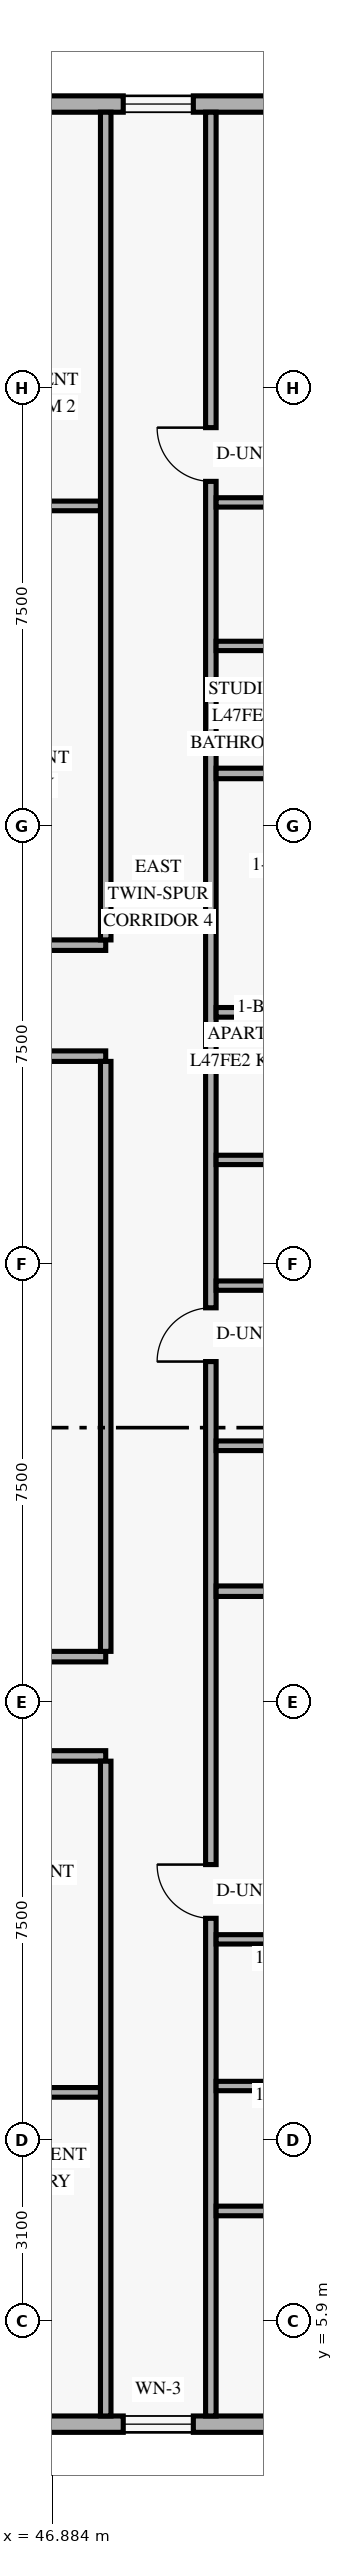
"""IFC4 building model, lengths in metres.
Left out: names, types, materials, properties, quantities, classifications, styles, units other than length and angle.
Written with IfcOpenShell. Run it as: python <this file> out.ifc"""

import sys

from ifc_helpers import new_model, si_unit, direction, frame, frame_2d, origin, place, context, subcontext, project, spatial, rectangle, extrude, element, fill, save


model = new_model("IFC4")
c1 = context("Model", 3, precision=1e-05, world=origin(), true_north=direction((0.0, 1.0)))
c2 = subcontext(c1, "Body", "Model", "MODEL_VIEW")
j1 = project(units=[si_unit("LENGTHUNIT", "METRE"), si_unit("PLANEANGLEUNIT", "RADIAN")], contexts=[c1])
p1 = place(None, origin())
s1 = spatial("IfcSite", under=j1, at=p1, CompositionType="ELEMENT")
p2 = place(p1, origin())
s2 = spatial("IfcBuilding", under=s1, at=p2, CompositionType="ELEMENT")
p3 = place(p2, frame((0.0, 0.0, 181.2)))
s3 = spatial("IfcBuildingStorey", under=s2, at=p3, CompositionType="ELEMENT", Elevation=181.2)
p4 = place(p3, frame((21.22, 4.14, 0.0), z_axis=(0.0, 0.0, 1.0), x_axis=(1.0, 0.0, 0.0)))
e1 = element("IfcWall", 1, at=p4, inside=s3, PredefinedType="SOLIDWALL", context=c2, shape_type="SweptSolid", body=[
    extrude(rectangle(XDim=33.76, YDim=0.28, at=frame_2d((16.88, 0.0))), origin(), (0.0, 0.0, 1.0), 3.36),
])
p5 = place(p4, frame((1.905, 0.0, 0.85)))
e2 = element("IfcOpeningElement", 2, at=p5, cuts=e1, PredefinedType="OPENING", context=c2, shape_type="SweptSolid", body=[
    extrude(rectangle(XDim=1.8, YDim=1.6, at=frame_2d((0.9, 0.8))), frame((0.0, 0.15, 0.0), z_axis=(0.0, -1.0, 0.0), x_axis=(1.0, 0.0, 0.0)), (0.0, 0.0, 1.0), 0.3),
])
p6 = place(p4, frame((8.79, 0.0, 0.85)))
e3 = element("IfcOpeningElement", 3, at=p6, cuts=e1, PredefinedType="OPENING", context=c2, shape_type="SweptSolid", body=[
    extrude(rectangle(XDim=1.8, YDim=1.6, at=frame_2d((0.9, 0.8))), frame((0.0, 0.15, 0.0), z_axis=(0.0, -1.0, 0.0), x_axis=(1.0, 0.0, 0.0)), (0.0, 0.0, 1.0), 0.3),
])
p7 = place(p4, frame((14.665, 0.0, 0.85)))
e4 = element("IfcOpeningElement", 4, at=p7, cuts=e1, PredefinedType="OPENING", context=c2, shape_type="SweptSolid", body=[
    extrude(rectangle(XDim=1.2, YDim=1.5, at=frame_2d((0.6, 0.75))), frame((0.0, 0.15, 0.0), z_axis=(0.0, -1.0, 0.0), x_axis=(1.0, 0.0, 0.0)), (0.0, 0.0, 1.0), 0.3),
])
p8 = place(p4, frame((18.525, 0.0, 0.85)))
e5 = element("IfcOpeningElement", 5, at=p8, cuts=e1, PredefinedType="OPENING", context=c2, shape_type="SweptSolid", body=[
    extrude(rectangle(XDim=1.8, YDim=1.6, at=frame_2d((0.9, 0.8))), frame((0.0, 0.15, 0.0), z_axis=(0.0, -1.0, 0.0), x_axis=(1.0, 0.0, 0.0)), (0.0, 0.0, 1.0), 0.3),
])
p9 = place(p4, frame((23.65, 0.0, 0.85)))
e6 = element("IfcOpeningElement", 6, at=p9, cuts=e1, PredefinedType="OPENING", context=c2, shape_type="SweptSolid", body=[
    extrude(rectangle(XDim=1.8, YDim=1.6, at=frame_2d((0.9, 0.8))), frame((0.0, 0.15, 0.0), z_axis=(0.0, -1.0, 0.0), x_axis=(1.0, 0.0, 0.0)), (0.0, 0.0, 1.0), 0.3),
])
p10 = place(p4, frame((26.88, 0.0, 0.85)))
e7 = element("IfcOpeningElement", 7, at=p10, cuts=e1, PredefinedType="OPENING", context=c2, shape_type="SweptSolid", body=[
    extrude(rectangle(XDim=1.2, YDim=1.5, at=frame_2d((0.6, 0.75))), frame((0.0, 0.15, 0.0), z_axis=(0.0, -1.0, 0.0), x_axis=(1.0, 0.0, 0.0)), (0.0, 0.0, 1.0), 0.3),
])
p11 = place(p4, frame((30.17, 0.0, 0.85)))
e8 = element("IfcOpeningElement", 8, at=p11, cuts=e1, PredefinedType="OPENING", context=c2, shape_type="SweptSolid", body=[
    extrude(rectangle(XDim=1.8, YDim=1.6, at=frame_2d((0.9, 0.8))), frame((0.0, 0.15, 0.0), z_axis=(0.0, -1.0, 0.0), x_axis=(1.0, 0.0, 0.0)), (0.0, 0.0, 1.0), 0.3),
])
p12 = place(p3, frame((54.98, 43.86, 0.0), z_axis=(0.0, 0.0, 1.0), x_axis=(-1.0, 0.0, 0.0)))
e9 = element("IfcWall", 9, at=p12, inside=s3, PredefinedType="SOLIDWALL", context=c2, shape_type="SweptSolid", body=[
    extrude(rectangle(XDim=33.76, YDim=0.28, at=frame_2d((16.88, 0.0))), origin(), (0.0, 0.0, 1.0), 3.36),
])
p13 = place(p12, frame((28.055, 0.0, 0.85)))
e10 = element("IfcOpeningElement", 10, at=p13, cuts=e9, PredefinedType="OPENING", context=c2, shape_type="SweptSolid", body=[
    extrude(rectangle(XDim=1.8, YDim=1.6, at=frame_2d((0.9, 0.8))), frame((0.0, 0.15, 0.0), z_axis=(0.0, -1.0, 0.0), x_axis=(1.0, 0.0, 0.0)), (0.0, 0.0, 1.0), 0.3),
])
p14 = place(p12, frame((21.17, 0.0, 0.85)))
e11 = element("IfcOpeningElement", 11, at=p14, cuts=e9, PredefinedType="OPENING", context=c2, shape_type="SweptSolid", body=[
    extrude(rectangle(XDim=1.8, YDim=1.6, at=frame_2d((0.9, 0.8))), frame((0.0, 0.15, 0.0), z_axis=(0.0, -1.0, 0.0), x_axis=(1.0, 0.0, 0.0)), (0.0, 0.0, 1.0), 0.3),
])
p15 = place(p12, frame((17.44, 0.0, 0.85)))
e12 = element("IfcOpeningElement", 12, at=p15, cuts=e9, PredefinedType="OPENING", context=c2, shape_type="SweptSolid", body=[
    extrude(rectangle(XDim=1.8, YDim=1.6, at=frame_2d((0.9, 0.8))), frame((0.0, 0.15, 0.0), z_axis=(0.0, -1.0, 0.0), x_axis=(1.0, 0.0, 0.0)), (0.0, 0.0, 1.0), 0.3),
])
p16 = place(p12, frame((13.32, 0.0, 0.85)))
e13 = element("IfcOpeningElement", 13, at=p16, cuts=e9, PredefinedType="OPENING", context=c2, shape_type="SweptSolid", body=[
    extrude(rectangle(XDim=1.8, YDim=1.6, at=frame_2d((0.9, 0.8))), frame((0.0, 0.15, 0.0), z_axis=(0.0, -1.0, 0.0), x_axis=(1.0, 0.0, 0.0)), (0.0, 0.0, 1.0), 0.3),
])
p17 = place(p12, frame((8.35, 0.0, 0.85)))
e14 = element("IfcOpeningElement", 14, at=p17, cuts=e9, PredefinedType="OPENING", context=c2, shape_type="SweptSolid", body=[
    extrude(rectangle(XDim=1.8, YDim=1.6, at=frame_2d((0.9, 0.8))), frame((0.0, 0.15, 0.0), z_axis=(0.0, -1.0, 0.0), x_axis=(1.0, 0.0, 0.0)), (0.0, 0.0, 1.0), 0.3),
])
p18 = place(p12, frame((5.68, 0.0, 0.85)))
e15 = element("IfcOpeningElement", 15, at=p18, cuts=e9, PredefinedType="OPENING", context=c2, shape_type="SweptSolid", body=[
    extrude(rectangle(XDim=1.2, YDim=1.5, at=frame_2d((0.6, 0.75))), frame((0.0, 0.15, 0.0), z_axis=(0.0, -1.0, 0.0), x_axis=(1.0, 0.0, 0.0)), (0.0, 0.0, 1.0), 0.3),
])
p19 = place(p12, frame((1.79, 0.0, 0.85)))
e16 = element("IfcOpeningElement", 16, at=p19, cuts=e9, PredefinedType="OPENING", context=c2, shape_type="SweptSolid", body=[
    extrude(rectangle(XDim=1.8, YDim=1.6, at=frame_2d((0.9, 0.8))), frame((0.0, 0.15, 0.0), z_axis=(0.0, -1.0, 0.0), x_axis=(1.0, 0.0, 0.0)), (0.0, 0.0, 1.0), 0.3),
])
p20 = place(p3, frame((37.633, 15.58, 0.0), z_axis=(0.0, 0.0, 1.0), x_axis=(1.0, 0.0, 0.0)))
e17 = element("IfcWall", 17, at=p20, inside=s3, PredefinedType="STANDARD", context=c2, shape_type="SweptSolid", body=[
    extrude(rectangle(XDim=10.167, YDim=0.18, at=frame_2d((5.084, 0.0))), origin(), (0.0, 0.0, 1.0), 2.73),
])
p21 = place(p20, frame((0.327, 0.0, 0.0)))
e18 = element("IfcOpeningElement", 18, at=p21, cuts=e17, PredefinedType="OPENING", context=c2, shape_type="SweptSolid", body=[
    extrude(rectangle(XDim=0.92, YDim=2.15, at=frame_2d((0.46, 1.075))), frame((0.0, 0.1, 0.0), z_axis=(0.0, -1.0, 0.0), x_axis=(1.0, 0.0, 0.0)), (0.0, 0.0, 1.0), 0.2),
])
p22 = place(p3, frame((37.64, 17.28, 0.0), z_axis=(0.0, 0.0, 1.0), x_axis=(1.0, 0.0, 0.0)))
e19 = element("IfcWall", 19, at=p22, inside=s3, PredefinedType="STANDARD", context=c2, shape_type="SweptSolid", body=[
    extrude(rectangle(XDim=10.16, YDim=0.18, at=frame_2d((5.08, 0.0))), origin(), (0.0, 0.0, 1.0), 2.73),
])
p23 = place(p22, frame((7.137, 0.0, 0.0)))
e20 = element("IfcOpeningElement", 20, at=p23, cuts=e19, PredefinedType="OPENING", context=c2, shape_type="SweptSolid", body=[
    extrude(rectangle(XDim=0.92, YDim=2.15, at=frame_2d((0.46, 1.075))), frame((0.0, 0.1, 0.0), z_axis=(0.0, -1.0, 0.0), x_axis=(1.0, 0.0, 0.0)), (0.0, 0.0, 1.0), 0.2),
])
p24 = place(p3, frame((37.64, 27.56, 0.0), z_axis=(0.0, 0.0, 1.0), x_axis=(1.0, 0.0, 0.0)))
e21 = element("IfcWall", 21, at=p24, inside=s3, PredefinedType="STANDARD", context=c2, shape_type="SweptSolid", body=[
    extrude(rectangle(XDim=10.16, YDim=0.18, at=frame_2d((5.08, 0.0))), origin(), (0.0, 0.0, 1.0), 2.73),
])
p25 = place(p3, frame((35.51, 29.46, 0.0), z_axis=(0.0, 0.0, 1.0), x_axis=(1.0, 0.0, 0.0)))
e22 = element("IfcWall", 22, at=p25, inside=s3, PredefinedType="STANDARD", context=c2, shape_type="SweptSolid", body=[
    extrude(rectangle(XDim=12.29, YDim=0.18, at=frame_2d((6.145, 0.0))), origin(), (0.0, 0.0, 1.0), 2.73),
])
p26 = place(p25, frame((0.32, 0.0, 0.0)))
e23 = element("IfcOpeningElement", 23, at=p26, cuts=e22, PredefinedType="OPENING", context=c2, shape_type="SweptSolid", body=[
    extrude(rectangle(XDim=0.92, YDim=2.15, at=frame_2d((0.46, 1.075))), frame((0.0, 0.1, 0.0), z_axis=(0.0, -1.0, 0.0), x_axis=(1.0, 0.0, 0.0)), (0.0, 0.0, 1.0), 0.2),
])
p27 = place(p3, frame((43.82, 9.82, 0.0), z_axis=(0.0, 0.0, 1.0), x_axis=(1.0, 0.0, 0.0)))
e24 = element("IfcWall", 24, at=p27, inside=s3, PredefinedType="PARTITIONING", context=c2, shape_type="SweptSolid", body=[
    extrude(rectangle(XDim=3.89, YDim=0.165, at=frame_2d((1.945, 0.0))), origin(), (0.0, 0.0, 1.0), 2.73),
])
p28 = place(p3, frame((43.74, 36.98, 0.0), z_axis=(0.0, 0.0, 1.0), x_axis=(1.0, 0.0, 0.0)))
e25 = element("IfcWall", 25, at=p28, inside=s3, PredefinedType="PARTITIONING", context=c2, shape_type="SweptSolid", body=[
    extrude(rectangle(XDim=3.97, YDim=0.165, at=frame_2d((1.985, 0.0))), origin(), (0.0, 0.0, 1.0), 2.73),
])
p29 = place(p3, frame((49.6, 4.28, 0.0), z_axis=(0.0, 0.0, 1.0), x_axis=(0.0, 1.0, 0.0)))
e26 = element("IfcWall", 26, at=p29, inside=s3, PredefinedType="STANDARD", context=c2, shape_type="SweptSolid", body=[
    extrude(rectangle(XDim=39.44, YDim=0.18, at=frame_2d((19.72, 0.0))), origin(), (0.0, 0.0, 1.0), 2.73),
])
p30 = place(p29, frame((8.52, 0.0, 0.0)))
e27 = element("IfcOpeningElement", 27, at=p30, cuts=e26, PredefinedType="OPENING", context=c2, shape_type="SweptSolid", body=[
    extrude(rectangle(XDim=0.92, YDim=2.15, at=frame_2d((0.46, 1.075))), frame((0.0, 0.1, 0.0), z_axis=(0.0, -1.0, 0.0), x_axis=(1.0, 0.0, 0.0)), (0.0, 0.0, 1.0), 0.2),
])
p31 = place(p29, frame((18.052, 0.0, 0.0)))
e28 = element("IfcOpeningElement", 28, at=p31, cuts=e26, PredefinedType="OPENING", context=c2, shape_type="SweptSolid", body=[
    extrude(rectangle(XDim=0.92, YDim=2.15, at=frame_2d((0.46, 1.075))), frame((0.0, 0.1, 0.0), z_axis=(0.0, -1.0, 0.0), x_axis=(1.0, 0.0, 0.0)), (0.0, 0.0, 1.0), 0.2),
])
p32 = place(p29, frame((33.12, 0.0, 0.0)))
e29 = element("IfcOpeningElement", 29, at=p32, cuts=e26, PredefinedType="OPENING", context=c2, shape_type="SweptSolid", body=[
    extrude(rectangle(XDim=0.92, YDim=2.15, at=frame_2d((0.46, 1.075))), frame((0.0, 0.1, 0.0), z_axis=(0.0, -1.0, 0.0), x_axis=(1.0, 0.0, 0.0)), (0.0, 0.0, 1.0), 0.2),
])
p33 = place(p3, frame((47.8, 4.28, 0.0), z_axis=(0.0, 0.0, 1.0), x_axis=(0.0, 1.0, 0.0)))
e30 = element("IfcWall", 30, at=p33, inside=s3, PredefinedType="STANDARD", context=c2, shape_type="SweptSolid", body=[
    extrude(rectangle(XDim=11.21, YDim=0.18, at=frame_2d((5.605, 0.0))), origin(), (0.0, 0.0, 1.0), 2.73),
])
p34 = place(p3, frame((47.8, 17.37, 0.0), z_axis=(0.0, 0.0, 1.0), x_axis=(0.0, 1.0, 0.0)))
e31 = element("IfcWall", 31, at=p34, inside=s3, PredefinedType="STANDARD", context=c2, shape_type="SweptSolid", body=[
    extrude(rectangle(XDim=10.1, YDim=0.18, at=frame_2d((5.05, 0.0))), origin(), (0.0, 0.0, 1.0), 2.73),
])
p35 = place(p3, frame((47.8, 29.55, 0.0), z_axis=(0.0, 0.0, 1.0), x_axis=(0.0, 1.0, 0.0)))
e32 = element("IfcWall", 32, at=p35, inside=s3, PredefinedType="STANDARD", context=c2, shape_type="SweptSolid", body=[
    extrude(rectangle(XDim=14.17, YDim=0.18, at=frame_2d((7.085, 0.0))), origin(), (0.0, 0.0, 1.0), 2.73),
])
p36 = place(p3, frame((49.69, 7.79, 0.0), z_axis=(0.0, 0.0, 1.0), x_axis=(1.0, 0.0, 0.0)))
e33 = element("IfcWall", 33, at=p36, inside=s3, PredefinedType="PARTITIONING", context=c2, shape_type="SweptSolid", body=[
    extrude(rectangle(XDim=8.63, YDim=0.165, at=frame_2d((4.315, 0.0))), origin(), (0.0, 0.0, 1.0), 2.879),
])
p37 = place(p36, frame((6.736, 0.0, 0.0)))
e34 = element("IfcOpeningElement", 34, at=p37, cuts=e33, PredefinedType="OPENING", context=c2, shape_type="SweptSolid", body=[
    extrude(rectangle(XDim=0.9, YDim=2.14, at=frame_2d((0.45, 1.07))), frame((0.0, 0.093, 0.0), z_axis=(0.0, -1.0, 0.0), x_axis=(1.0, 0.0, 0.0)), (0.0, 0.0, 1.0), 0.185),
])
p38 = place(p3, frame((49.69, 12.44, 0.0), z_axis=(0.0, 0.0, 1.0), x_axis=(1.0, 0.0, 0.0)))
e35 = element("IfcWall", 35, at=p38, inside=s3, PredefinedType="PLUMBINGWALL", context=c2, shape_type="SweptSolid", body=[
    extrude(rectangle(XDim=5.511, YDim=0.16, at=frame_2d((2.756, 0.0))), origin(), (0.0, 0.0, 1.0), 2.879),
])
p39 = place(p3, frame((49.69, 9.929, 0.0), z_axis=(0.0, 0.0, 1.0), x_axis=(1.0, 0.0, 0.0)))
e36 = element("IfcWall", 36, at=p39, inside=s3, PredefinedType="PLUMBINGWALL", context=c2, shape_type="SweptSolid", body=[
    extrude(rectangle(XDim=5.351, YDim=0.16, at=frame_2d((2.676, 0.0))), origin(), (0.0, 0.0, 1.0), 2.879),
])
p40 = place(p3, frame((49.69, 18.4, 0.0), z_axis=(0.0, 0.0, 1.0), x_axis=(1.0, 0.0, 0.0)))
e37 = element("IfcWall", 37, at=p40, inside=s3, PredefinedType="PARTITIONING", context=c2, shape_type="SweptSolid", body=[
    extrude(rectangle(XDim=8.63, YDim=0.18, at=frame_2d((4.315, 0.0))), origin(), (0.0, 0.0, 1.0), 2.879),
])
p41 = place(p3, frame((49.69, 28.31, 0.0), z_axis=(0.0, 0.0, 1.0), x_axis=(1.0, 0.0, 0.0)))
e38 = element("IfcWall", 38, at=p41, inside=s3, PredefinedType="PARTITIONING", context=c2, shape_type="SweptSolid", body=[
    extrude(rectangle(XDim=8.63, YDim=0.165, at=frame_2d((4.315, 0.0))), origin(), (0.0, 0.0, 1.0), 2.879),
])
p42 = place(p41, frame((2.796, 0.0, 0.0)))
e39 = element("IfcOpeningElement", 39, at=p42, cuts=e38, PredefinedType="OPENING", context=c2, shape_type="SweptSolid", body=[
    extrude(rectangle(XDim=0.88, YDim=2.12, at=frame_2d((0.44, 1.06))), frame((0.0, 0.093, 0.0), z_axis=(0.0, -1.0, 0.0), x_axis=(1.0, 0.0, 0.0)), (0.0, 0.0, 1.0), 0.185),
])
p43 = place(p41, frame((5.946, 0.0, 0.0)))
e40 = element("IfcOpeningElement", 40, at=p43, cuts=e38, PredefinedType="OPENING", context=c2, shape_type="SweptSolid", body=[
    extrude(rectangle(XDim=0.9, YDim=2.14, at=frame_2d((0.45, 1.07))), frame((0.0, 0.093, 0.0), z_axis=(0.0, -1.0, 0.0), x_axis=(1.0, 0.0, 0.0)), (0.0, 0.0, 1.0), 0.185),
])
p44 = place(p3, frame((49.69, 23.632, 0.0), z_axis=(0.0, 0.0, 1.0), x_axis=(1.0, 0.0, 0.0)))
e41 = element("IfcWall", 41, at=p44, inside=s3, PredefinedType="PLUMBINGWALL", context=c2, shape_type="SweptSolid", body=[
    extrude(rectangle(XDim=2.636, YDim=0.16, at=frame_2d((1.318, 0.0))), origin(), (0.0, 0.0, 1.0), 3.36),
])
p45 = place(p3, frame((49.69, 25.784, 0.0), z_axis=(0.0, 0.0, 1.0), x_axis=(1.0, 0.0, 0.0)))
e42 = element("IfcWall", 42, at=p45, inside=s3, PredefinedType="PLUMBINGWALL", context=c2, shape_type="SweptSolid", body=[
    extrude(rectangle(XDim=2.476, YDim=0.16, at=frame_2d((1.238, 0.0))), origin(), (0.0, 0.0, 1.0), 3.36),
])
p46 = place(p3, frame((49.69, 20.89, 0.0), z_axis=(0.0, 0.0, 1.0), x_axis=(1.0, 0.0, 0.0)))
e43 = element("IfcWall", 43, at=p46, inside=s3, PredefinedType="PARTITIONING", context=c2, shape_type="SweptSolid", body=[
    extrude(rectangle(XDim=8.63, YDim=0.165, at=frame_2d((4.315, 0.0))), origin(), (0.0, 0.0, 1.0), 2.879),
])
p47 = place(p46, frame((4.29, 0.0, 0.0)))
e44 = element("IfcOpeningElement", 44, at=p47, cuts=e43, PredefinedType="OPENING", context=c2, shape_type="SweptSolid", body=[
    extrude(rectangle(XDim=0.95, YDim=2.15, at=frame_2d((0.475, 1.075))), frame((0.0, 0.093, 0.0), z_axis=(0.0, -1.0, 0.0), x_axis=(1.0, 0.0, 0.0)), (0.0, 0.0, 1.0), 0.185),
])
p48 = place(p3, frame((49.69, 32.4, 0.0), z_axis=(0.0, 0.0, 1.0), x_axis=(1.0, 0.0, 0.0)))
e45 = element("IfcWall", 45, at=p48, inside=s3, PredefinedType="PARTITIONING", context=c2, shape_type="SweptSolid", body=[
    extrude(rectangle(XDim=8.63, YDim=0.18, at=frame_2d((4.315, 0.0))), origin(), (0.0, 0.0, 1.0), 2.879),
])
p49 = place(p3, frame((49.69, 37.04, 0.0), z_axis=(0.0, 0.0, 1.0), x_axis=(1.0, 0.0, 0.0)))
e46 = element("IfcWall", 46, at=p49, inside=s3, PredefinedType="PLUMBINGWALL", context=c2, shape_type="SweptSolid", body=[
    extrude(rectangle(XDim=2.682, YDim=0.16, at=frame_2d((1.341, 0.0))), origin(), (0.0, 0.0, 1.0), 3.36),
])
p50 = place(p3, frame((49.69, 34.583, 0.0), z_axis=(0.0, 0.0, 1.0), x_axis=(1.0, 0.0, 0.0)))
e47 = element("IfcWall", 47, at=p50, inside=s3, PredefinedType="PLUMBINGWALL", context=c2, shape_type="SweptSolid", body=[
    extrude(rectangle(XDim=2.522, YDim=0.16, at=frame_2d((1.261, 0.0))), origin(), (0.0, 0.0, 1.0), 2.984),
])
p51 = place(p10, origin())
e48 = element("IfcWindow", 48, at=p51, inside=s3, PartitioningType="SINGLE_PANEL", PredefinedType="WINDOW", context=c2, shape_type="SweptSolid", body=[
    extrude(rectangle(XDim=1.2, YDim=1.5, at=frame_2d((0.6, 0.75))), frame((0.0, 0.03, 0.0), z_axis=(0.0, -1.0, 0.0), x_axis=(1.0, 0.0, 0.0)), (0.0, 0.0, 1.0), 0.06),
])
fill(e7, e48)
p52 = place(p18, origin())
e49 = element("IfcWindow", 49, at=p52, inside=s3, PartitioningType="SINGLE_PANEL", PredefinedType="WINDOW", context=c2, shape_type="SweptSolid", body=[
    extrude(rectangle(XDim=1.2, YDim=1.5, at=frame_2d((0.6, 0.75))), frame((0.0, 0.03, 0.0), z_axis=(0.0, -1.0, 0.0), x_axis=(1.0, 0.0, 0.0)), (0.0, 0.0, 1.0), 0.06),
])
fill(e15, e49)
p53 = place(p30, origin())
e50 = element("IfcDoor", 50, at=p53, inside=s3, OperationType="SINGLE_SWING_RIGHT", PredefinedType="DOOR", context=c2, shape_type="SweptSolid", body=[
    extrude(rectangle(XDim=0.92, YDim=2.15, at=frame_2d((0.46, 1.075))), frame((0.0, 0.025, 0.0), z_axis=(0.0, -1.0, 0.0), x_axis=(1.0, 0.0, 0.0)), (0.0, 0.0, 1.0), 0.05),
])
fill(e27, e50)
p54 = place(p31, origin())
e51 = element("IfcDoor", 51, at=p54, inside=s3, OperationType="SINGLE_SWING_LEFT", PredefinedType="DOOR", context=c2, shape_type="SweptSolid", body=[
    extrude(rectangle(XDim=0.92, YDim=2.15, at=frame_2d((0.46, 1.075))), frame((0.0, 0.025, 0.0), z_axis=(0.0, -1.0, 0.0), x_axis=(1.0, 0.0, 0.0)), (0.0, 0.0, 1.0), 0.05),
])
fill(e28, e51)
p55 = place(p32, origin())
e52 = element("IfcDoor", 52, at=p55, inside=s3, OperationType="SINGLE_SWING_RIGHT", PredefinedType="DOOR", context=c2, shape_type="SweptSolid", body=[
    extrude(rectangle(XDim=0.92, YDim=2.15, at=frame_2d((0.46, 1.075))), frame((0.0, 0.025, 0.0), z_axis=(0.0, -1.0, 0.0), x_axis=(1.0, 0.0, 0.0)), (0.0, 0.0, 1.0), 0.05),
])
fill(e29, e52)
save(model, sys.argv[1])
